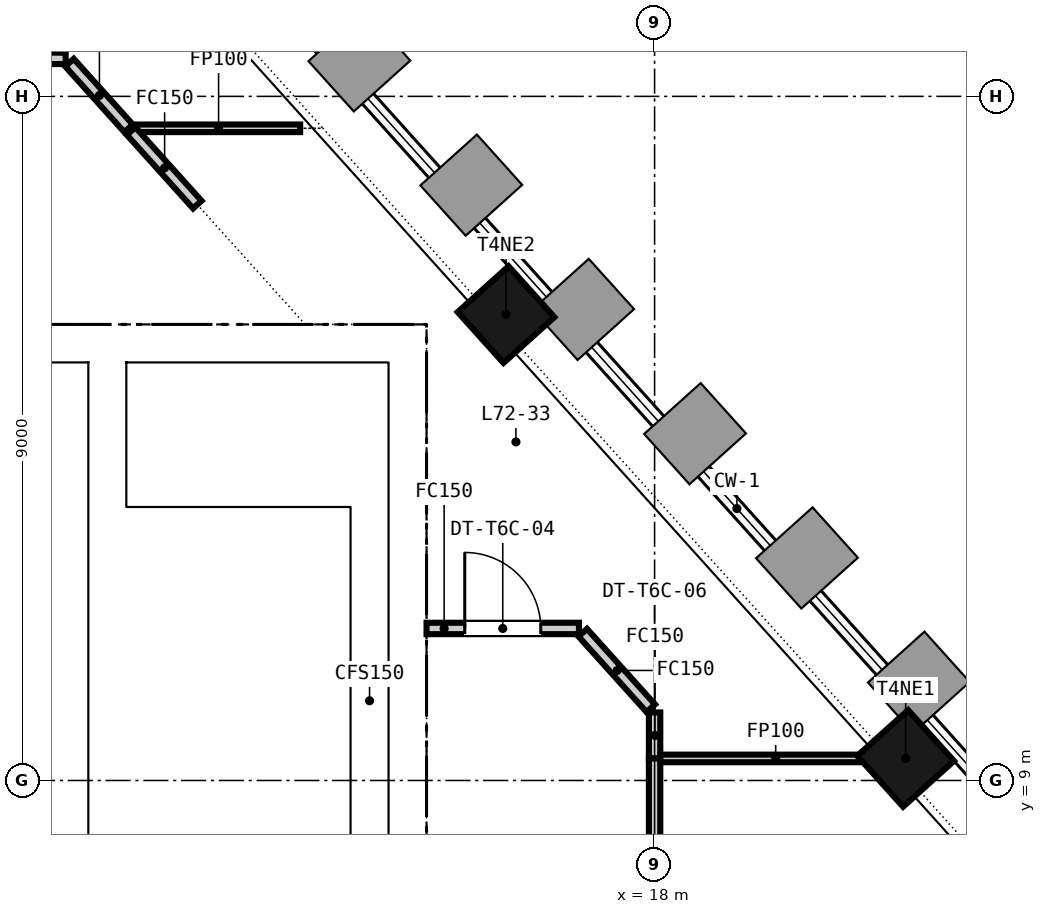
"""IFC4 building model, lengths in metres.
Left out: names, types, materials, properties, quantities, classifications, styles, units other than length and angle.
Written with IfcOpenShell. Run it as: python <this file> out.ifc"""

import sys

from ifc_helpers import new_model, si_unit, direction, frame, frame_2d, origin, origin_2d, place, context, subcontext, project, spatial, rectangle, extrude, element, fill, save


model = new_model("IFC4")
c1 = context("Model", 3, precision=1e-05, world=origin(), true_north=direction((0.0, 1.0)))
c2 = subcontext(c1, "Body", "Model", "MODEL_VIEW")
j1 = project(units=[si_unit("LENGTHUNIT", "METRE"), si_unit("PLANEANGLEUNIT", "RADIAN")], contexts=[c1])
p1 = place(None, origin())
s1 = spatial("IfcSite", under=j1, at=p1, CompositionType="ELEMENT")
p2 = place(p1, origin())
s2 = spatial("IfcBuilding", under=s1, at=p2, CompositionType="ELEMENT")
p3 = place(p2, frame((0.0, 0.0, 282.85)))
s3 = spatial("IfcBuildingStorey", under=s2, at=p3, CompositionType="ELEMENT", Elevation=282.85)
p4 = place(p3, frame((-15.0, 14.75, -0.15), z_axis=(0.0, 0.0, 1.0), x_axis=(1.0, 0.0, 0.0)))
e1 = element("IfcWall", 1, at=p4, inside=s3, PredefinedType="SOLIDWALL", context=c2, shape_type="SweptSolid", body=[
    extrude(rectangle(XDim=30.0, YDim=0.5, at=frame_2d((15.0, 0.0))), origin(), (0.0, 0.0, 1.0), 3.65),
])
p5 = place(p4, frame((9.25, 0.0, 0.15)))
e2 = element("IfcOpeningElement", 2, at=p5, cuts=e1, PredefinedType="OPENING", context=c2, shape_type="SweptSolid", body=[
    extrude(rectangle(XDim=1.5, YDim=2.1, at=frame_2d((0.75, 1.05))), frame((0.0, 0.26, 0.0), z_axis=(0.0, -1.0, 0.0), x_axis=(1.0, 0.0, 0.0)), (0.0, 0.0, 1.0), 0.52),
])
p6 = place(p4, frame((19.4, 0.0, 0.15)))
e3 = element("IfcOpeningElement", 3, at=p6, cuts=e1, PredefinedType="OPENING", context=c2, shape_type="SweptSolid", body=[
    extrude(rectangle(XDim=1.5, YDim=2.1, at=frame_2d((0.75, 1.05))), frame((0.0, 0.26, 0.0), z_axis=(0.0, -1.0, 0.0), x_axis=(1.0, 0.0, 0.0)), (0.0, 0.0, 1.0), 0.52),
])
p7 = place(p4, frame((1.5, 0.0, 0.15)))
e4 = element("IfcOpeningElement", 4, at=p7, cuts=e1, PredefinedType="OPENING", context=c2, shape_type="SweptSolid", body=[
    extrude(rectangle(XDim=1.2, YDim=2.1, at=frame_2d((0.6, 1.05))), frame((0.0, 0.26, 0.0), z_axis=(0.0, -1.0, 0.0), x_axis=(1.0, 0.0, 0.0)), (0.0, 0.0, 1.0), 0.52),
])
p8 = place(p4, frame((27.3, 0.0, 0.15)))
e5 = element("IfcOpeningElement", 5, at=p8, cuts=e1, PredefinedType="OPENING", context=c2, shape_type="SweptSolid", body=[
    extrude(rectangle(XDim=1.2, YDim=2.1, at=frame_2d((0.6, 1.05))), frame((0.0, 0.26, 0.0), z_axis=(0.0, -1.0, 0.0), x_axis=(1.0, 0.0, 0.0)), (0.0, 0.0, 1.0), 0.52),
])
for number, where, z_axis, x_axis in (
    (6, (14.75, 0.5, -0.15), (0.0, 0.0, 1.0), (0.0, 1.0, 0.0)),
    (7, (10.8, 0.5, -0.15), (0.0, 0.0, 1.0), (0.0, 1.0, 0.0)),
):
    element("IfcWall", number, at=place(p3, frame(where, z_axis=z_axis, x_axis=x_axis)), inside=s3, PredefinedType="SOLIDWALL", context=c2, shape_type="SweptSolid", body=[
        extrude(rectangle(XDim=14.0, YDim=0.5, at=frame_2d((7.0, 0.0))), origin(), (0.0, 0.0, 1.0), 3.65),
    ])
for number, where, z_axis, x_axis in (
    (8, (21.303, 9.29, -0.15), (0.0, 0.0, 1.0), (-0.669, 0.743, 0.0)),
    (9, (16.045, 15.129, -0.15), (0.0, 0.0, 1.0), (-0.669, 0.743, 0.0)),
):
    element("IfcColumn", number, at=place(p3, frame(where, z_axis=z_axis, x_axis=x_axis)), inside=s3, PredefinedType="COLUMN", context=c2, shape_type="SweptSolid", body=[
        extrude(rectangle(XDim=0.9, YDim=0.9, at=origin_2d()), origin(), (0.0, 0.0, 1.0), 3.65),
    ])
p9 = place(p3, frame((-4.125, 8.55, 0.0), z_axis=(0.0, 0.0, 1.0), x_axis=(1.0, 0.0, 0.0)))
e10 = element("IfcWall", 10, at=p9, inside=s3, PredefinedType="PARTITIONING", context=c2, shape_type="SweptSolid", body=[
    extrude(rectangle(XDim=14.675, YDim=0.2, at=frame_2d((7.337, 0.0))), origin(), (0.0, 0.0, 1.0), 3.5),
])
p10 = place(p9, frame((1.413, 0.0, 0.0)))
e11 = element("IfcOpeningElement", 11, at=p10, cuts=e10, PredefinedType="OPENING", context=c2, shape_type="SweptSolid", body=[
    extrude(rectangle(XDim=1.0, YDim=2.1, at=frame_2d((0.5, 1.05))), frame((0.0, 0.11, 0.0), z_axis=(0.0, -1.0, 0.0), x_axis=(1.0, 0.0, 0.0)), (0.0, 0.0, 1.0), 0.22),
])
p11 = place(p9, frame((5.0, 0.0, 0.0)))
e12 = element("IfcOpeningElement", 12, at=p11, cuts=e10, PredefinedType="OPENING", context=c2, shape_type="SweptSolid", body=[
    extrude(rectangle(XDim=1.0, YDim=2.1, at=frame_2d((0.5, 1.05))), frame((0.0, 0.11, 0.0), z_axis=(0.0, -1.0, 0.0), x_axis=(1.0, 0.0, 0.0)), (0.0, 0.0, 1.0), 0.22),
])
p12 = place(p9, frame((9.613, 0.0, 0.0)))
e13 = element("IfcOpeningElement", 13, at=p12, cuts=e10, PredefinedType="OPENING", context=c2, shape_type="SweptSolid", body=[
    extrude(rectangle(XDim=1.0, YDim=2.1, at=frame_2d((0.5, 1.05))), frame((0.0, 0.11, 0.0), z_axis=(0.0, -1.0, 0.0), x_axis=(1.0, 0.0, 0.0)), (0.0, 0.0, 1.0), 0.22),
])
p13 = place(p9, frame((13.475, 0.0, 0.0)))
e14 = element("IfcOpeningElement", 14, at=p13, cuts=e10, PredefinedType="OPENING", context=c2, shape_type="SweptSolid", body=[
    extrude(rectangle(XDim=0.9, YDim=2.1, at=frame_2d((0.45, 1.05))), frame((0.0, 0.11, 0.0), z_axis=(0.0, -1.0, 0.0), x_axis=(1.0, 0.0, 0.0)), (0.0, 0.0, 1.0), 0.22),
])
p14 = place(p3, frame((5.9, 11.2, 0.0), z_axis=(0.0, 0.0, 1.0), x_axis=(1.0, 0.0, 0.0)))
e15 = element("IfcWall", 15, at=p14, inside=s3, PredefinedType="PARTITIONING", context=c2, shape_type="SweptSolid", body=[
    extrude(rectangle(XDim=4.65, YDim=0.2, at=frame_2d((2.325, 0.0))), origin(), (0.0, 0.0, 1.0), 3.5),
])
p15 = place(p14, frame((1.025, 0.0, 0.0)))
e16 = element("IfcOpeningElement", 16, at=p15, cuts=e15, PredefinedType="OPENING", context=c2, shape_type="SweptSolid", body=[
    extrude(rectangle(XDim=1.0, YDim=2.1, at=frame_2d((0.5, 1.05))), frame((0.0, 0.11, 0.0), z_axis=(0.0, -1.0, 0.0), x_axis=(1.0, 0.0, 0.0)), (0.0, 0.0, 1.0), 0.22),
])
p16 = place(p14, frame((3.4, 0.0, 0.0)))
e17 = element("IfcOpeningElement", 17, at=p16, cuts=e15, PredefinedType="OPENING", context=c2, shape_type="SweptSolid", body=[
    extrude(rectangle(XDim=0.9, YDim=2.1, at=frame_2d((0.45, 1.05))), frame((0.0, 0.11, 0.0), z_axis=(0.0, -1.0, 0.0), x_axis=(1.0, 0.0, 0.0)), (0.0, 0.0, 1.0), 0.22),
])
p17 = place(p3, frame((14.25, 0.5, 0.0), z_axis=(0.0, 0.0, 1.0), x_axis=(0.0, 1.0, 0.0)))
e18 = element("IfcWall", 18, at=p17, inside=s3, PredefinedType="SOLIDWALL", context=c2, shape_type="SweptSolid", body=[
    extrude(rectangle(XDim=14.0, YDim=0.5, at=frame_2d((7.0, 0.0))), origin(), (0.0, 0.0, 1.0), 3.5),
])
p18 = place(p3, frame((18.0, 9.895, 0.0), z_axis=(0.0, 0.0, 1.0), x_axis=(0.0, -1.0, 0.0)))
e19 = element("IfcWall", 19, at=p18, inside=s3, PredefinedType="PARTITIONING", context=c2, shape_type="SweptSolid", body=[
    extrude(rectangle(XDim=0.605, YDim=0.15, at=frame_2d((0.302, 0.0))), origin(), (0.0, 0.0, 1.0), 2.75),
])
p19 = place(p3, frame((18.0, 9.29, 0.0), z_axis=(0.0, 0.0, 1.0), x_axis=(0.0, -1.0, 0.0)))
e20 = element("IfcWall", 20, at=p19, inside=s3, PredefinedType="PARTITIONING", context=c2, shape_type="SweptSolid", body=[
    extrude(rectangle(XDim=12.615, YDim=0.15, at=frame_2d((6.308, 0.0))), origin(), (0.0, 0.0, 1.0), 2.75),
])
p20 = place(p19, frame((5.808, 0.0, 0.0)))
e21 = element("IfcOpeningElement", 21, at=p20, cuts=e20, PredefinedType="OPENING", context=c2, shape_type="SweptSolid", body=[
    extrude(rectangle(XDim=1.0, YDim=2.1, at=frame_2d((0.5, 1.05))), frame((0.0, 0.085, 0.0), z_axis=(0.0, -1.0, 0.0), x_axis=(1.0, 0.0, 0.0)), (0.0, 0.0, 1.0), 0.17),
])
p21 = place(p3, frame((-0.125, 18.5, 0.0), z_axis=(0.0, 0.0, 1.0), x_axis=(1.0, 0.0, 0.0)))
e22 = element("IfcWall", 22, at=p21, inside=s3, PredefinedType="PARTITIONING", context=c2, shape_type="SweptSolid", body=[
    extrude(rectangle(XDim=10.377, YDim=0.15, at=frame_2d((5.188, 0.0))), origin(), (0.0, 0.0, 1.0), 2.75),
])
p22 = place(p21, frame((4.688, 0.0, 0.0)))
e23 = element("IfcOpeningElement", 23, at=p22, cuts=e22, PredefinedType="OPENING", context=c2, shape_type="SweptSolid", body=[
    extrude(rectangle(XDim=1.0, YDim=2.1, at=frame_2d((0.5, 1.05))), frame((0.0, 0.085, 0.0), z_axis=(0.0, -1.0, 0.0), x_axis=(1.0, 0.0, 0.0)), (0.0, 0.0, 1.0), 0.17),
])
p23 = place(p3, frame((10.302, 18.444, 0.0), z_axis=(0.0, 0.0, 1.0), x_axis=(0.668964731622, -0.743294146247, 0.0)))
e24 = element("IfcWall", 24, at=p23, inside=s3, PredefinedType="PARTITIONING", context=c2, shape_type="SweptSolid", body=[
    extrude(rectangle(XDim=1.163, YDim=0.15, at=frame_2d((0.582, 0.0))), origin(), (0.0, 0.0, 1.0), 2.75),
])
p24 = place(p3, frame((11.181, 17.58, 0.0), z_axis=(0.0, 0.0, 1.0), x_axis=(1.0, 0.0, 0.0)))
e25 = element("IfcWall", 25, at=p24, inside=s3, PredefinedType="PARTITIONING", context=c2, shape_type="SweptSolid", body=[
    extrude(rectangle(XDim=2.156, YDim=0.1, at=frame_2d((1.078, 0.0))), origin(), (0.0, 0.0, 1.0), 2.75),
])
p25 = place(p3, frame((11.114, 17.543, 0.0), z_axis=(0.0, 0.0, 1.0), x_axis=(0.669172057426, -0.743107500675, 0.0)))
e26 = element("IfcWall", 26, at=p25, inside=s3, PredefinedType="PARTITIONING", context=c2, shape_type="SweptSolid", body=[
    extrude(rectangle(XDim=1.301, YDim=0.15, at=frame_2d((0.65, 0.0))), origin(), (0.0, 0.0, 1.0), 2.75),
])
p26 = place(p3, frame((15.0, 11.0, 0.0), z_axis=(0.0, 0.0, 1.0), x_axis=(1.0, 0.0, 0.0)))
e27 = element("IfcWall", 27, at=p26, inside=s3, PredefinedType="PARTITIONING", context=c2, shape_type="SweptSolid", body=[
    extrude(rectangle(XDim=2.005, YDim=0.15, at=frame_2d((1.002, 0.0))), origin(), (0.0, 0.0, 1.0), 2.75),
])
p27 = place(p26, frame((0.502, 0.0, 0.0)))
e28 = element("IfcOpeningElement", 28, at=p27, cuts=e27, PredefinedType="OPENING", context=c2, shape_type="SweptSolid", body=[
    extrude(rectangle(XDim=1.0, YDim=2.1, at=frame_2d((0.5, 1.05))), frame((0.0, 0.085, 0.0), z_axis=(0.0, -1.0, 0.0), x_axis=(1.0, 0.0, 0.0)), (0.0, 0.0, 1.0), 0.17),
])
p28 = place(p3, frame((17.055, 10.944, 0.0), z_axis=(0.0, 0.0, 1.0), x_axis=(0.669065612335, -0.743203341213, 0.0)))
e29 = element("IfcWall", 29, at=p28, inside=s3, PredefinedType="PARTITIONING", context=c2, shape_type="SweptSolid", body=[
    extrude(rectangle(XDim=1.337, YDim=0.15, at=frame_2d((0.668, 0.0))), origin(), (0.0, 0.0, 1.0), 2.75),
])
p29 = place(p3, frame((18.075, 9.29, 0.0), z_axis=(0.0, 0.0, 1.0), x_axis=(1.0, 0.0, 0.0)))
e30 = element("IfcWall", 30, at=p29, inside=s3, PredefinedType="PARTITIONING", context=c2, shape_type="SweptSolid", body=[
    extrude(rectangle(XDim=3.026, YDim=0.1, at=frame_2d((1.513, 0.0))), origin(), (0.0, 0.0, 1.0), 2.75),
])
p30 = place(p13, origin())
e31 = element("IfcDoor", 31, at=p30, inside=s3, OperationType="SINGLE_SWING_RIGHT", PredefinedType="DOOR", context=c2, shape_type="SweptSolid", body=[
    extrude(rectangle(XDim=0.9, YDim=2.1, at=frame_2d((0.45, 1.05))), frame((0.0, 0.025, 0.0), z_axis=(0.0, -1.0, 0.0), x_axis=(1.0, 0.0, 0.0)), (0.0, 0.0, 1.0), 0.05),
])
fill(e14, e31)
p31 = place(p16, origin())
e32 = element("IfcDoor", 32, at=p31, inside=s3, OperationType="SINGLE_SWING_LEFT", PredefinedType="DOOR", context=c2, shape_type="SweptSolid", body=[
    extrude(rectangle(XDim=0.9, YDim=2.1, at=frame_2d((0.45, 1.05))), frame((0.0, 0.025, 0.0), z_axis=(0.0, -1.0, 0.0), x_axis=(1.0, 0.0, 0.0)), (0.0, 0.0, 1.0), 0.05),
])
fill(e17, e32)
p32 = place(p8, origin())
e33 = element("IfcDoor", 33, at=p32, inside=s3, OperationType="SINGLE_SWING_LEFT", PredefinedType="DOOR", context=c2, shape_type="SweptSolid", body=[
    extrude(rectangle(XDim=1.2, YDim=2.1, at=frame_2d((0.6, 1.05))), frame((0.0, 0.025, 0.0), z_axis=(0.0, -1.0, 0.0), x_axis=(1.0, 0.0, 0.0)), (0.0, 0.0, 1.0), 0.05),
])
fill(e5, e33)
p33 = place(p27, origin())
e34 = element("IfcDoor", 34, at=p33, inside=s3, OperationType="SINGLE_SWING_LEFT", PredefinedType="DOOR", context=c2, shape_type="SweptSolid", body=[
    extrude(rectangle(XDim=1.0, YDim=2.1, at=frame_2d((0.5, 1.05))), frame((0.0, 0.025, 0.0), z_axis=(0.0, -1.0, 0.0), x_axis=(1.0, 0.0, 0.0)), (0.0, 0.0, 1.0), 0.05),
])
fill(e28, e34)
save(model, sys.argv[1])
